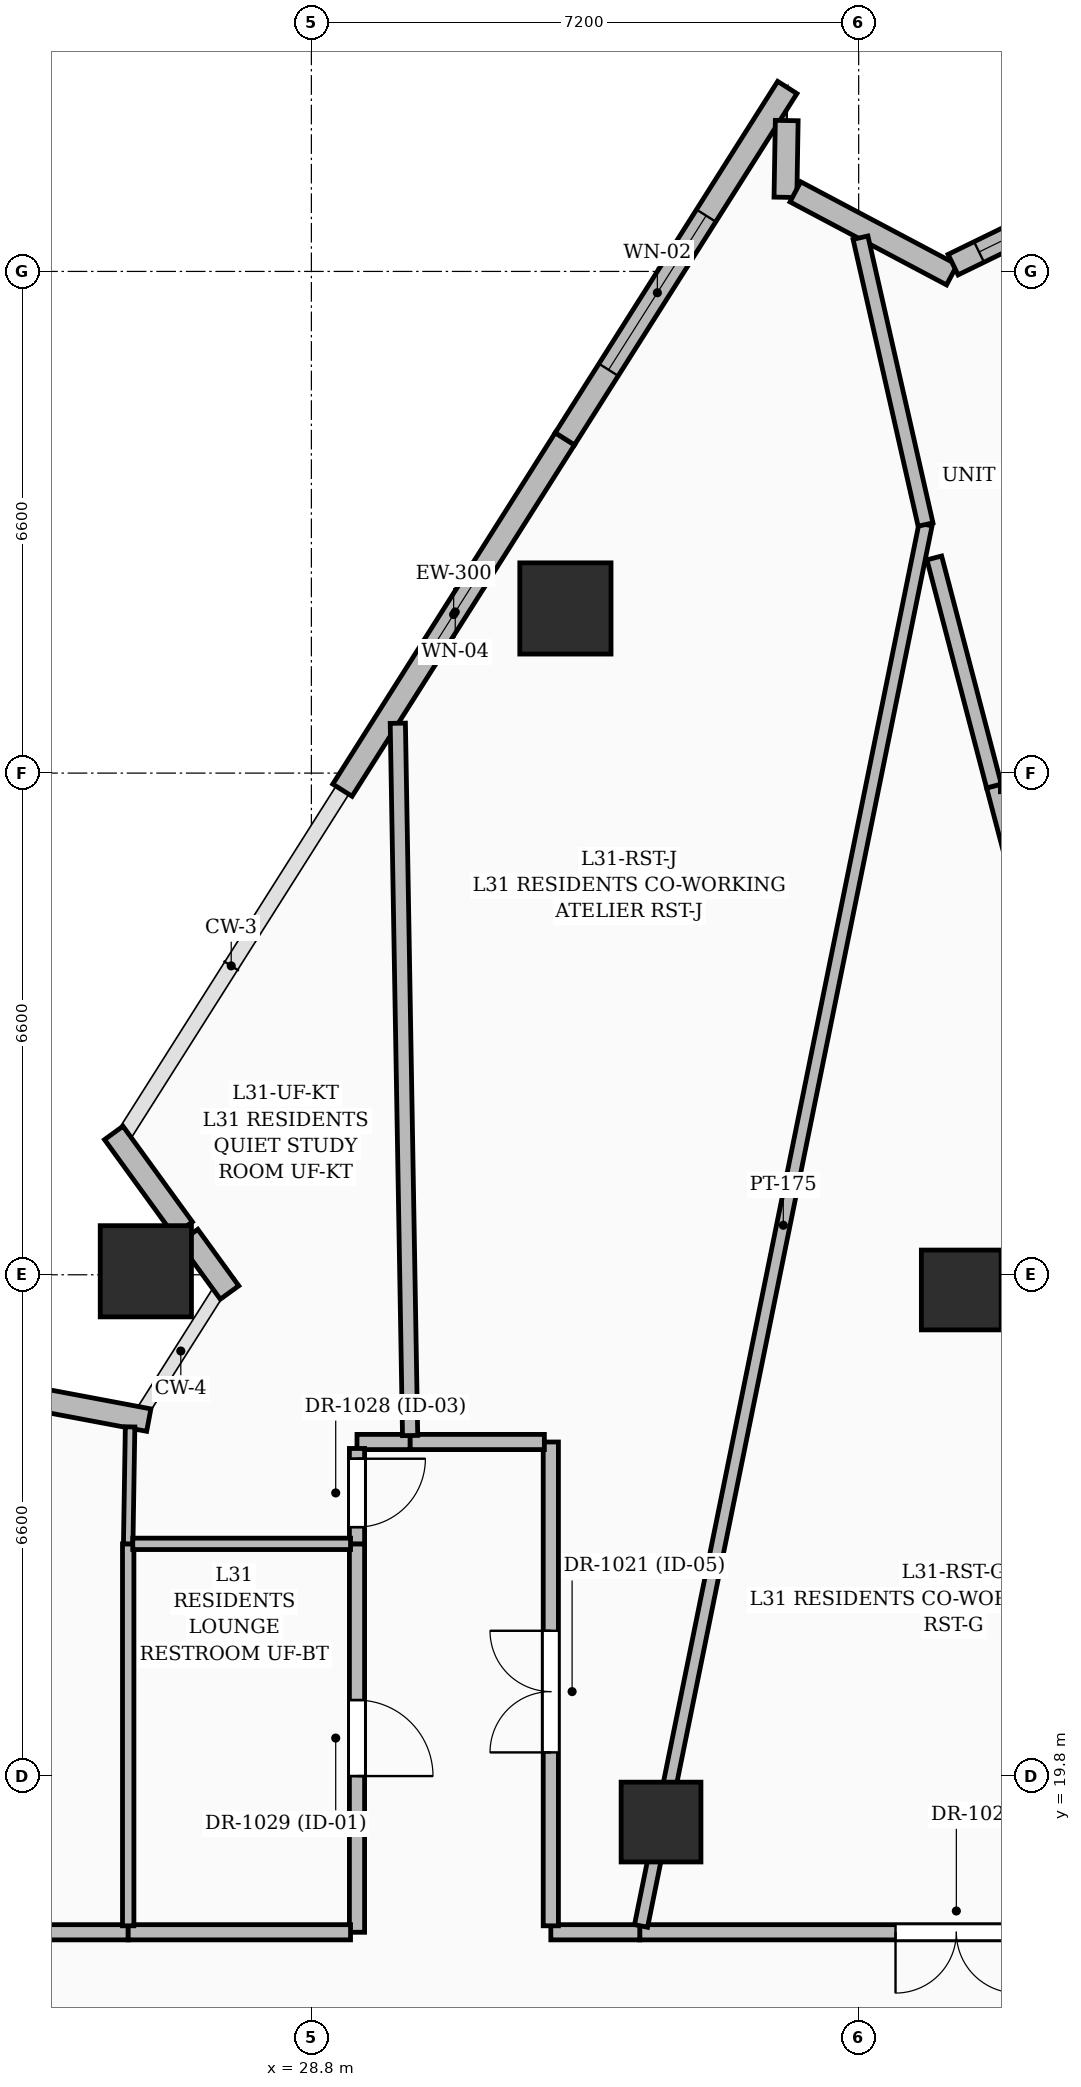
"""IFC4 building model, lengths in metres.
Left out: names, types, materials, properties, quantities, classifications, styles, units other than length and angle.
Written with IfcOpenShell. Run it as: python <this file> out.ifc"""

import sys

from ifc_helpers import new_model, si_unit, direction, frame, frame_2d, origin, origin_2d, place, context, subcontext, project, spatial, rectangle, extrude, element, fill, save


model = new_model("IFC4")
c1 = context("Model", 3, precision=1e-05, world=origin(), true_north=direction((0.0, 1.0)))
c2 = subcontext(c1, "Body", "Model", "MODEL_VIEW")
j1 = project(units=[si_unit("LENGTHUNIT", "METRE"), si_unit("PLANEANGLEUNIT", "RADIAN")], contexts=[c1])
p1 = place(None, origin())
s1 = spatial("IfcSite", under=j1, at=p1, CompositionType="ELEMENT")
p2 = place(p1, origin())
s2 = spatial("IfcBuilding", under=s1, at=p2, CompositionType="ELEMENT")
p3 = place(p2, frame((0.0, 0.0, 124.8)))
s3 = spatial("IfcBuildingStorey", under=s2, at=p3, CompositionType="ELEMENT", Elevation=124.8)
for number, where, z_axis, x_axis in (
    (1, (37.35, 26.2, 0.0), (0.0, 0.0, 1.0), (1.0, 0.0, 0.0)),
    (2, (33.4, 19.2, 0.0), (0.0, 0.0, 1.0), (1.0, 0.0, 0.0)),
):
    element("IfcColumn", number, at=place(p3, frame(where, z_axis=z_axis, x_axis=x_axis)), inside=s3, PredefinedType="COLUMN", context=c2, shape_type="SweptSolid", body=[
        extrude(rectangle(XDim=1.05, YDim=1.05, at=origin_2d()), origin(), (0.0, 0.0, 1.0), 3.6),
    ])
for number, where, z_axis, x_axis in (
    (3, (32.142, 35.166, 0.0), (0.0, 0.0, 1.0), (1.0, 0.0, 0.0)),
    (4, (26.622, 26.446, 0.0), (0.0, 0.0, 1.0), (1.0, 0.0, 0.0)),
):
    element("IfcColumn", number, at=place(p3, frame(where, z_axis=z_axis, x_axis=x_axis)), inside=s3, PredefinedType="COLUMN", context=c2, shape_type="SweptSolid", body=[
        extrude(rectangle(XDim=1.2, YDim=1.2, at=origin_2d()), origin(), (0.0, 0.0, 1.0), 3.6),
    ])
p4 = place(p3, frame((24.111, 24.968, 0.0), z_axis=(0.0, 0.0, 1.0), x_axis=(0.982733402646, -0.185027185367, 0.0)))
e5 = element("IfcWall", 5, at=p4, inside=s3, PredefinedType="SOLIDWALL", context=c2, shape_type="SweptSolid", body=[
    extrude(rectangle(XDim=2.594, YDim=0.3, at=frame_2d((1.297, 0.0))), origin(), (0.0, 0.0, 1.0), 2.575),
])
p5 = place(p3, frame((27.723, 26.167, 0.0), z_axis=(0.0, 0.0, 1.0), x_axis=(-0.587159290159, 0.809471412701, 0.0)))
e6 = element("IfcWall", 6, at=p5, inside=s3, PredefinedType="SOLIDWALL", context=c2, shape_type="SweptSolid", body=[
    extrude(rectangle(XDim=0.918, YDim=0.3, at=frame_2d((0.459, 0.0))), origin(), (0.0, 0.0, 1.0), 2.575),
])
p6 = place(p3, frame((27.113, 27.008, 0.0), z_axis=(0.0, 0.0, 1.0), x_axis=(-0.58731233988, 0.809360374262, 0.0)))
e7 = element("IfcWall", 7, at=p6, inside=s3, PredefinedType="SOLIDWALL", context=c2, shape_type="SweptSolid", body=[
    extrude(rectangle(XDim=1.555, YDim=0.3, at=frame_2d((0.777, 0.0))), origin(), (0.0, 0.0, 1.0), 2.575),
])
p7 = place(p3, frame((29.208, 32.775, 0.0), z_axis=(0.0, 0.0, 1.0), x_axis=(0.534927859629, 0.844897736411, 0.0)))
e8 = element("IfcWall", 8, at=p7, inside=s3, PredefinedType="SOLIDWALL", context=c2, shape_type="SweptSolid", body=[
    extrude(rectangle(XDim=5.471, YDim=0.3, at=frame_2d((2.735, 0.0))), origin(), (0.0, 0.0, 1.0), 3.35),
])
p8 = place(p7, frame((2.175, 0.0, 0.8)))
e9 = element("IfcOpeningElement", 9, at=p8, cuts=e8, PredefinedType="OPENING", context=c2, shape_type="SweptSolid", body=[
    extrude(rectangle(XDim=1.2, YDim=1.8, at=frame_2d((0.6, 0.9))), frame((0.0, 0.16, 0.0), z_axis=(0.0, -1.0, 0.0), x_axis=(1.0, 0.0, 0.0)), (0.0, 0.0, 1.0), 0.32),
])
p9 = place(p3, frame((32.135, 37.398, 0.0), z_axis=(0.0, 0.0, 1.0), x_axis=(0.534896002359, 0.844917905278, 0.0)))
e10 = element("IfcWall", 10, at=p9, inside=s3, PredefinedType="SOLIDWALL", context=c2, shape_type="SweptSolid", body=[
    extrude(rectangle(XDim=5.471, YDim=0.3, at=frame_2d((2.735, 0.0))), origin(), (0.0, 0.0, 1.0), 3.35),
])
p10 = place(p9, frame((1.075, 0.0, 0.6)))
e11 = element("IfcOpeningElement", 11, at=p10, cuts=e10, PredefinedType="OPENING", context=c2, shape_type="SweptSolid", body=[
    extrude(rectangle(XDim=2.4, YDim=2.1, at=frame_2d((1.2, 1.05))), frame((0.0, 0.16, 0.0), z_axis=(0.0, -1.0, 0.0), x_axis=(1.0, 0.0, 0.0)), (0.0, 0.0, 1.0), 0.32),
])
p11 = place(p3, frame((35.054, 41.585, 0.0), z_axis=(0.0, 0.0, 1.0), x_axis=(-0.016913964816, -0.999856948665, 0.0)))
e12 = element("IfcWall", 12, at=p11, inside=s3, PredefinedType="SOLIDWALL", context=c2, shape_type="SweptSolid", body=[
    extrude(rectangle(XDim=1.01, YDim=0.3, at=frame_2d((0.505, 0.0))), origin(), (0.0, 0.0, 1.0), 3.35),
])
p12 = place(p3, frame((35.167, 40.647, 0.0), z_axis=(0.0, 0.0, 1.0), x_axis=(0.883555999994, -0.468325522339, 0.0)))
e13 = element("IfcWall", 13, at=p12, inside=s3, PredefinedType="SOLIDWALL", context=c2, shape_type="SweptSolid", body=[
    extrude(rectangle(XDim=2.331, YDim=0.3, at=frame_2d((1.166, 0.0))), origin(), (0.0, 0.0, 1.0), 3.35),
])
p13 = place(p3, frame((37.242, 39.689, 0.0), z_axis=(0.0, 0.0, 1.0), x_axis=(0.898736119344, 0.438489894738, 0.0)))
e14 = element("IfcWall", 14, at=p13, inside=s3, PredefinedType="SOLIDWALL", context=c2, shape_type="SweptSolid", body=[
    extrude(rectangle(XDim=2.323, YDim=0.3, at=frame_2d((1.161, 0.0))), origin(), (0.0, 0.0, 1.0), 3.35),
])
p14 = place(p13, frame((0.38, 0.0, 0.8)))
e15 = element("IfcOpeningElement", 15, at=p14, cuts=e14, PredefinedType="OPENING", context=c2, shape_type="SweptSolid", body=[
    extrude(rectangle(XDim=1.2, YDim=1.8, at=frame_2d((0.6, 0.9))), frame((0.0, 0.16, 0.0), z_axis=(0.0, -1.0, 0.0), x_axis=(1.0, 0.0, 0.0)), (0.0, 0.0, 1.0), 0.32),
])
p15 = place(p3, frame((26.39, 17.75, 0.0), z_axis=(0.0, 0.0, 1.0), x_axis=(-1.0, 0.0, 0.0)))
e16 = element("IfcWall", 16, at=p15, inside=s3, PredefinedType="PARTITIONING", context=c2, shape_type="SweptSolid", body=[
    extrude(rectangle(XDim=4.99, YDim=0.2, at=frame_2d((2.495, 0.0))), origin(), (0.0, 0.0, 1.0), 2.372),
])
p16 = place(p3, frame((29.4, 22.86, 0.0), z_axis=(0.0, 0.0, 1.0), x_axis=(0.0, -1.0, 0.0)))
e17 = element("IfcWall", 17, at=p16, inside=s3, PredefinedType="PARTITIONING", context=c2, shape_type="SweptSolid", body=[
    extrude(rectangle(XDim=5.11, YDim=0.2, at=frame_2d((2.555, 0.0))), origin(), (0.0, 0.0, 1.0), 2.86),
])
p17 = place(p16, frame((2.055, 0.0, 0.0)))
e18 = element("IfcOpeningElement", 18, at=p17, cuts=e17, PredefinedType="OPENING", context=c2, shape_type="SweptSolid", body=[
    extrude(rectangle(XDim=1.0, YDim=2.2, at=frame_2d((0.5, 1.1))), frame((0.0, 0.11, 0.0), z_axis=(0.0, -1.0, 0.0), x_axis=(1.0, 0.0, 0.0)), (0.0, 0.0, 1.0), 0.22),
])
p18 = place(p3, frame((29.315, 17.75, 0.0), z_axis=(0.0, 0.0, 1.0), x_axis=(-1.0, 0.0, 0.0)))
e19 = element("IfcWall", 19, at=p18, inside=s3, PredefinedType="PARTITIONING", context=c2, shape_type="SweptSolid", body=[
    extrude(rectangle(XDim=2.925, YDim=0.2, at=frame_2d((1.462, 0.0))), origin(), (0.0, 0.0, 1.0), 2.86),
])
p19 = place(p3, frame((30.1, 24.2, 0.0), z_axis=(0.0, 0.0, 1.0), x_axis=(-1.0, 0.0, 0.0)))
e20 = element("IfcWall", 20, at=p19, inside=s3, PredefinedType="PARTITIONING", context=c2, shape_type="SweptSolid", body=[
    extrude(rectangle(XDim=0.7, YDim=0.2, at=frame_2d((0.35, 0.0))), origin(), (0.0, 0.0, 1.0), 3.35),
])
p20 = place(p3, frame((29.4, 24.115, 0.0), z_axis=(0.0, 0.0, 1.0), x_axis=(0.0, -1.0, 0.0)))
e21 = element("IfcWall", 21, at=p20, inside=s3, PredefinedType="PARTITIONING", context=c2, shape_type="SweptSolid", body=[
    extrude(rectangle(XDim=1.255, YDim=0.2, at=frame_2d((0.627, 0.0))), origin(), (0.0, 0.0, 1.0), 2.372),
])
p21 = place(p20, frame((0.135, 0.0, 0.0)))
e22 = element("IfcOpeningElement", 22, at=p21, cuts=e21, PredefinedType="OPENING", context=c2, shape_type="SweptSolid", body=[
    extrude(rectangle(XDim=0.9, YDim=2.1, at=frame_2d((0.45, 1.05))), frame((0.0, 0.11, 0.0), z_axis=(0.0, -1.0, 0.0), x_axis=(1.0, 0.0, 0.0)), (0.0, 0.0, 1.0), 0.22),
])
p22 = place(p3, frame((41.365, 17.75, 0.0), z_axis=(0.0, 0.0, 1.0), x_axis=(-1.0, 0.0, 0.0)))
e23 = element("IfcWall", 23, at=p22, inside=s3, PredefinedType="PARTITIONING", context=c2, shape_type="SweptSolid", body=[
    extrude(rectangle(XDim=8.245, YDim=0.2, at=frame_2d((4.123, 0.0))), origin(), (0.0, 0.0, 1.0), 2.436),
])
p23 = place(p22, frame((3.28, 0.0, 0.0)))
e24 = element("IfcOpeningElement", 24, at=p23, cuts=e23, PredefinedType="OPENING", context=c2, shape_type="SweptSolid", body=[
    extrude(rectangle(XDim=1.6, YDim=2.3, at=frame_2d((0.8, 1.15))), frame((0.0, 0.11, 0.0), z_axis=(0.0, -1.0, 0.0), x_axis=(1.0, 0.0, 0.0)), (0.0, 0.0, 1.0), 0.22),
])
p24 = place(p3, frame((33.12, 17.75, 0.0), z_axis=(0.0, 0.0, 1.0), x_axis=(-1.0, 0.0, 0.0)))
e25 = element("IfcWall", 25, at=p24, inside=s3, PredefinedType="PARTITIONING", context=c2, shape_type="SweptSolid", body=[
    extrude(rectangle(XDim=1.17, YDim=0.2, at=frame_2d((0.585, 0.0))), origin(), (0.0, 0.0, 1.0), 3.35),
])
p25 = place(p3, frame((31.95, 17.835, 0.0), z_axis=(0.0, 0.0, 1.0), x_axis=(0.0, 1.0, 0.0)))
e26 = element("IfcWall", 26, at=p25, inside=s3, PredefinedType="PARTITIONING", context=c2, shape_type="SweptSolid", body=[
    extrude(rectangle(XDim=6.365, YDim=0.2, at=frame_2d((3.183, 0.0))), origin(), (0.0, 0.0, 1.0), 2.372),
])
p26 = place(p25, frame((2.281, 0.0, 0.0)))
e27 = element("IfcOpeningElement", 27, at=p26, cuts=e26, PredefinedType="OPENING", context=c2, shape_type="SweptSolid", body=[
    extrude(rectangle(XDim=1.6, YDim=2.3, at=frame_2d((0.8, 1.15))), frame((0.0, 0.11, 0.0), z_axis=(0.0, -1.0, 0.0), x_axis=(1.0, 0.0, 0.0)), (0.0, 0.0, 1.0), 0.22),
])
p27 = place(p3, frame((31.865, 24.2, 0.0), z_axis=(0.0, 0.0, 1.0), x_axis=(-1.0, 0.0, 0.0)))
e28 = element("IfcWall", 28, at=p27, inside=s3, PredefinedType="PARTITIONING", context=c2, shape_type="SweptSolid", body=[
    extrude(rectangle(XDim=1.765, YDim=0.2, at=frame_2d((0.882, 0.0))), origin(), (0.0, 0.0, 1.0), 2.86),
])
p28 = place(p3, frame((26.39, 17.835, 0.0), z_axis=(0.0, 0.0, 1.0), x_axis=(0.0, 1.0, 0.0)))
e29 = element("IfcWall", 29, at=p28, inside=s3, PredefinedType="PARTITIONING", context=c2, shape_type="SweptSolid", body=[
    extrude(rectangle(XDim=5.025, YDim=0.15, at=frame_2d((2.513, 0.0))), origin(), (0.0, 0.0, 1.0), 2.86),
])
p29 = place(p3, frame((26.39, 22.86, 0.0), z_axis=(0.0, 0.0, 1.0), x_axis=(0.016180651537, 0.999869084689, 0.0)))
e30 = element("IfcWall", 30, at=p29, inside=s3, PredefinedType="PARTITIONING", context=c2, shape_type="SweptSolid", body=[
    extrude(rectangle(XDim=1.539, YDim=0.125, at=frame_2d((0.77, 0.0))), origin(), (0.0, 0.0, 1.0), 3.35),
])
p30 = place(p3, frame((29.315, 22.86, 0.0), z_axis=(0.0, 0.0, 1.0), x_axis=(-1.0, 0.0, 0.0)))
e31 = element("IfcWall", 31, at=p30, inside=s3, PredefinedType="PARTITIONING", context=c2, shape_type="SweptSolid", body=[
    extrude(rectangle(XDim=2.865, YDim=0.15, at=frame_2d((1.433, 0.0))), origin(), (0.0, 0.0, 1.0), 2.86),
])
p31 = place(p3, frame((30.099, 24.285, 0.0), z_axis=(0.0, 0.0, 1.0), x_axis=(-0.017270245909, 0.999850858181, 0.0)))
e32 = element("IfcWall", 32, at=p31, inside=s3, PredefinedType="PARTITIONING", context=c2, shape_type="SweptSolid", body=[
    extrude(rectangle(XDim=9.373, YDim=0.2, at=frame_2d((4.686, 0.0))), origin(), (0.0, 0.0, 1.0), 2.57),
])
p32 = place(p3, frame((36.88, 36.27, 0.0), z_axis=(0.0, 0.0, 1.0), x_axis=(-0.198955349965, -0.980008555432, 0.0)))
e33 = element("IfcWall", 33, at=p32, inside=s3, PredefinedType="PARTITIONING", context=c2, shape_type="SweptSolid", body=[
    extrude(rectangle(XDim=18.813, YDim=0.175, at=frame_2d((9.406, 0.0))), origin(), (0.0, 0.0, 1.0), 2.372),
])
p33 = place(p3, frame((39.46, 26.448, 0.0), z_axis=(0.0, 0.0, 1.0), x_axis=(-0.254555210874, 0.967058242619, 0.0)))
e34 = element("IfcWall", 34, at=p33, inside=s3, PredefinedType="PARTITIONING", context=c2, shape_type="SweptSolid", body=[
    extrude(rectangle(XDim=6.599, YDim=0.2, at=frame_2d((3.3, 0.0))), origin(), (0.0, 0.0, 1.0), 2.436),
])
p34 = place(p3, frame((37.78, 32.83, 0.0), z_axis=(0.0, 0.0, 1.0), x_axis=(-0.253133149474, 0.967431449064, 0.0)))
e35 = element("IfcWall", 35, at=p34, inside=s3, PredefinedType="PARTITIONING", context=c2, shape_type="SweptSolid", body=[
    extrude(rectangle(XDim=3.102, YDim=0.2, at=frame_2d((1.551, 0.0))), origin(), (0.0, 0.0, 1.0), 2.57),
])
p35 = place(p3, frame((36.88, 36.27, 0.0), z_axis=(0.0, 0.0, 1.0), x_axis=(-0.221190241938, 0.975230678799, 0.0)))
e36 = element("IfcWall", 36, at=p35, inside=s3, PredefinedType="PARTITIONING", context=c2, shape_type="SweptSolid", body=[
    extrude(rectangle(XDim=3.87, YDim=0.2, at=frame_2d((1.935, 0.0))), origin(), (0.0, 0.0, 1.0), 3.35),
])
p36 = place(p3, frame((39.56, 32.83, 0.0), z_axis=(0.0, 0.0, 1.0), x_axis=(-1.0, 0.0, 0.0)))
e37 = element("IfcWall", 37, at=p36, inside=s3, PredefinedType="PARTITIONING", context=c2, shape_type="SweptSolid", body=[
    extrude(rectangle(XDim=1.695, YDim=0.15, at=frame_2d((0.848, 0.0))), origin(), (0.0, 0.0, 1.0), 3.35),
])
p37 = place(p8, origin())
e38 = element("IfcWindow", 38, at=p37, inside=s3, PartitioningType="SINGLE_PANEL", PredefinedType="WINDOW", context=c2, shape_type="SweptSolid", body=[
    extrude(rectangle(XDim=1.2, YDim=1.8, at=frame_2d((0.6, 0.9))), frame((0.0, 0.03, 0.0), z_axis=(0.0, -1.0, 0.0), x_axis=(1.0, 0.0, 0.0)), (0.0, 0.0, 1.0), 0.06),
])
fill(e9, e38)
p38 = place(p10, origin())
e39 = element("IfcWindow", 39, at=p38, inside=s3, PartitioningType="SINGLE_PANEL", PredefinedType="WINDOW", context=c2, shape_type="SweptSolid", body=[
    extrude(rectangle(XDim=2.4, YDim=2.1, at=frame_2d((1.2, 1.05))), frame((0.0, 0.03, 0.0), z_axis=(0.0, -1.0, 0.0), x_axis=(1.0, 0.0, 0.0)), (0.0, 0.0, 1.0), 0.06),
])
fill(e11, e39)
p39 = place(p14, origin())
e40 = element("IfcWindow", 40, at=p39, inside=s3, PartitioningType="SINGLE_PANEL", PredefinedType="WINDOW", context=c2, shape_type="SweptSolid", body=[
    extrude(rectangle(XDim=1.2, YDim=1.8, at=frame_2d((0.6, 0.9))), frame((0.0, 0.03, 0.0), z_axis=(0.0, -1.0, 0.0), x_axis=(1.0, 0.0, 0.0)), (0.0, 0.0, 1.0), 0.06),
])
fill(e15, e40)
p40 = place(p23, origin())
e41 = element("IfcDoor", 41, at=p40, inside=s3, OperationType="DOUBLE_DOOR_SINGLE_SWING", PredefinedType="DOOR", context=c2, shape_type="SweptSolid", body=[
    extrude(rectangle(XDim=1.6, YDim=2.3, at=frame_2d((0.8, 1.15))), frame((0.0, 0.025, 0.0), z_axis=(0.0, -1.0, 0.0), x_axis=(1.0, 0.0, 0.0)), (0.0, 0.0, 1.0), 0.05),
])
fill(e24, e41)
p41 = place(p26, origin())
e42 = element("IfcDoor", 42, at=p41, inside=s3, OperationType="DOUBLE_DOOR_SINGLE_SWING", PredefinedType="DOOR", context=c2, shape_type="SweptSolid", body=[
    extrude(rectangle(XDim=1.6, YDim=2.3, at=frame_2d((0.8, 1.15))), frame((0.0, 0.025, 0.0), z_axis=(0.0, -1.0, 0.0), x_axis=(1.0, 0.0, 0.0)), (0.0, 0.0, 1.0), 0.05),
])
fill(e27, e42)
p42 = place(p21, origin())
e43 = element("IfcDoor", 43, at=p42, inside=s3, OperationType="SINGLE_SWING_LEFT", PredefinedType="DOOR", context=c2, shape_type="SweptSolid", body=[
    extrude(rectangle(XDim=0.9, YDim=2.1, at=frame_2d((0.45, 1.05))), frame((0.0, 0.025, 0.0), z_axis=(0.0, -1.0, 0.0), x_axis=(1.0, 0.0, 0.0)), (0.0, 0.0, 1.0), 0.05),
])
fill(e22, e43)
p43 = place(p17, origin())
e44 = element("IfcDoor", 44, at=p43, inside=s3, OperationType="SINGLE_SWING_RIGHT", PredefinedType="DOOR", context=c2, shape_type="SweptSolid", body=[
    extrude(rectangle(XDim=1.0, YDim=2.2, at=frame_2d((0.5, 1.1))), frame((0.0, 0.025, 0.0), z_axis=(0.0, -1.0, 0.0), x_axis=(1.0, 0.0, 0.0)), (0.0, 0.0, 1.0), 0.05),
])
fill(e18, e44)
save(model, sys.argv[1])
